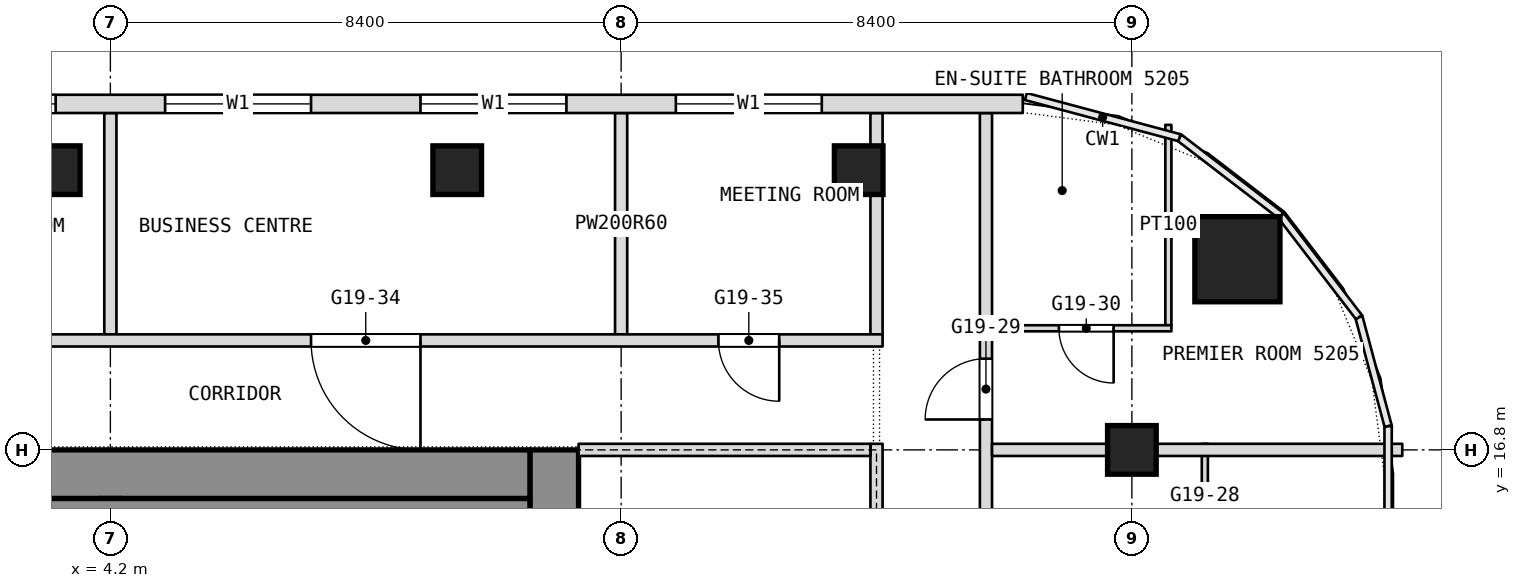
"""IFC4 building model, lengths in metres.
Left out: names, types, materials, properties, quantities, classifications, styles, units other than length and angle.
Written with IfcOpenShell. Run it as: python <this file> out.ifc"""

import sys

from ifc_helpers import new_model, si_unit, direction, frame, frame_2d, origin, origin_2d, place, context, subcontext, project, spatial, rectangle, extrude, element, fill, save


model = new_model("IFC4")
c1 = context("Model", 3, precision=1e-05, world=origin(), true_north=direction((0.0, 1.0)))
c2 = subcontext(c1, "Body", "Model", "MODEL_VIEW")
j1 = project(units=[si_unit("LENGTHUNIT", "METRE"), si_unit("PLANEANGLEUNIT", "RADIAN")], contexts=[c1])
p1 = place(None, origin())
s1 = spatial("IfcSite", under=j1, at=p1, CompositionType="ELEMENT")
p2 = place(p1, origin())
s2 = spatial("IfcBuilding", under=s1, at=p2, CompositionType="ELEMENT")
p3 = place(p2, frame((0.0, 0.0, 223.7)))
s3 = spatial("IfcBuildingStorey", under=s2, at=p3, CompositionType="ELEMENT", Elevation=223.7)
p4 = place(p3, frame((11.5, 0.0, 0.0), z_axis=(0.0, 0.0, 1.0), x_axis=(0.0, 1.0, 0.0)))
e1 = element("IfcWall", 1, at=p4, inside=s3, PredefinedType="SHEAR", context=c2, shape_type="SweptSolid", body=[
    extrude(rectangle(XDim=16.8, YDim=0.8, at=frame_2d((8.4, 0.0))), origin(), (0.0, 0.0, 1.0), 3.6),
])
p5 = place(p4, frame((2.3, 0.0, 0.0)))
e2 = element("IfcOpeningElement", 2, at=p5, cuts=e1, PredefinedType="OPENING", context=c2, shape_type="SweptSolid", body=[
    extrude(rectangle(XDim=1.1, YDim=2.1, at=frame_2d((0.55, 1.05))), frame((0.0, 0.4, 0.0), z_axis=(0.0, -1.0, 0.0), x_axis=(1.0, 0.0, 0.0)), (0.0, 0.0, 1.0), 0.8),
])
p6 = place(p4, frame((4.85, 0.0, 0.0)))
e3 = element("IfcOpeningElement", 3, at=p6, cuts=e1, PredefinedType="OPENING", context=c2, shape_type="SweptSolid", body=[
    extrude(rectangle(XDim=1.1, YDim=2.1, at=frame_2d((0.55, 1.05))), frame((0.0, 0.4, 0.0), z_axis=(0.0, -1.0, 0.0), x_axis=(1.0, 0.0, 0.0)), (0.0, 0.0, 1.0), 0.8),
])
p7 = place(p4, frame((6.825, 0.0, 0.0)))
e4 = element("IfcOpeningElement", 4, at=p7, cuts=e1, PredefinedType="OPENING", context=c2, shape_type="SweptSolid", body=[
    extrude(rectangle(XDim=1.2, YDim=2.1, at=frame_2d((0.6, 1.05))), frame((0.0, 0.4, 0.0), z_axis=(0.0, -1.0, 0.0), x_axis=(1.0, 0.0, 0.0)), (0.0, 0.0, 1.0), 0.8),
])
p8 = place(p4, frame((13.4, 0.0, 0.0)))
e5 = element("IfcOpeningElement", 5, at=p8, cuts=e1, PredefinedType="OPENING", context=c2, shape_type="SweptSolid", body=[
    extrude(rectangle(XDim=1.1, YDim=2.1, at=frame_2d((0.55, 1.05))), frame((0.0, 0.4, 0.0), z_axis=(0.0, -1.0, 0.0), x_axis=(1.0, 0.0, 0.0)), (0.0, 0.0, 1.0), 0.8),
])
p9 = place(p4, frame((10.85, 0.0, 0.0)))
e6 = element("IfcOpeningElement", 6, at=p9, cuts=e1, PredefinedType="OPENING", context=c2, shape_type="SweptSolid", body=[
    extrude(rectangle(XDim=1.1, YDim=2.1, at=frame_2d((0.55, 1.05))), frame((0.0, 0.4, 0.0), z_axis=(0.0, -1.0, 0.0), x_axis=(1.0, 0.0, 0.0)), (0.0, 0.0, 1.0), 0.8),
])
p10 = place(p4, frame((8.775, 0.0, 0.0)))
e7 = element("IfcOpeningElement", 7, at=p10, cuts=e1, PredefinedType="OPENING", context=c2, shape_type="SweptSolid", body=[
    extrude(rectangle(XDim=1.2, YDim=2.1, at=frame_2d((0.6, 1.05))), frame((0.0, 0.4, 0.0), z_axis=(0.0, -1.0, 0.0), x_axis=(1.0, 0.0, 0.0)), (0.0, 0.0, 1.0), 0.8),
])
p11 = place(p3, frame((-11.1, 16.4, 0.0), z_axis=(0.0, 0.0, 1.0), x_axis=(1.0, 0.0, 0.0)))
e8 = element("IfcWall", 8, at=p11, inside=s3, PredefinedType="SHEAR", context=c2, shape_type="SweptSolid", body=[
    extrude(rectangle(XDim=22.2, YDim=0.8, at=frame_2d((11.1, 0.0))), origin(), (0.0, 0.0, 1.0), 3.6),
])
p12 = place(p3, frame((4.2, 0.8, 0.0), z_axis=(0.0, 0.0, 1.0), x_axis=(0.0, 1.0, 0.0)))
e9 = element("IfcWall", 9, at=p12, inside=s3, PredefinedType="SHEAR", context=c2, shape_type="SweptSolid", body=[
    extrude(rectangle(XDim=15.2, YDim=0.4, at=frame_2d((7.6, 0.0))), origin(), (0.0, 0.0, 1.0), 3.6),
])
p13 = place(p12, frame((5.95, 0.0, 0.0)))
e10 = element("IfcOpeningElement", 10, at=p13, cuts=e9, PredefinedType="OPENING", context=c2, shape_type="SweptSolid", body=[
    extrude(rectangle(XDim=1.2, YDim=2.1, at=frame_2d((0.6, 1.05))), frame((0.0, 0.2, 0.0), z_axis=(0.0, -1.0, 0.0), x_axis=(1.0, 0.0, 0.0)), (0.0, 0.0, 1.0), 0.4),
])
p14 = place(p3, frame((22.736, 19.936, 0.0), z_axis=(0.0, 0.0, 1.0), x_axis=(1.0, 0.0, 0.0)))
e11 = element("IfcColumn", 11, at=p14, inside=s3, PredefinedType="COLUMN", context=c2, shape_type="SweptSolid", body=[
    extrude(rectangle(XDim=1.4, YDim=1.4, at=origin_2d()), origin(), (0.0, 0.0, 1.0), 3.6),
])
for number, where, z_axis, x_axis in (
    (12, (21.0, 16.8, 0.0), (0.0, 0.0, 1.0), (1.0, 0.0, 0.0)),
    (13, (3.302, 21.4, 0.0), (0.0, 0.0, 1.0), (1.0, 0.0, 0.0)),
    (14, (9.904, 21.4, 0.0), (0.0, 0.0, 1.0), (1.0, 0.0, 0.0)),
    (15, (16.507, 21.4, 0.0), (0.0, 0.0, 1.0), (1.0, 0.0, 0.0)),
):
    element("IfcColumn", number, at=place(p3, frame(where, z_axis=z_axis, x_axis=x_axis)), inside=s3, PredefinedType="COLUMN", context=c2, shape_type="SweptSolid", body=[
        extrude(rectangle(XDim=0.8, YDim=0.8, at=origin_2d()), origin(), (0.0, 0.0, 1.0), 3.6),
    ])
p15 = place(p3, frame((22.2, 14.45, 0.0), z_axis=(0.0, 0.0, 1.0), x_axis=(0.0, 1.0, 0.0)))
e16 = element("IfcWall", 16, at=p15, inside=s3, PredefinedType="PARTITIONING", context=c2, shape_type="SweptSolid", body=[
    extrude(rectangle(XDim=2.45, YDim=0.1, at=frame_2d((1.225, 0.0))), origin(), (0.0, 0.0, 1.0), 3.34),
])
p16 = place(p15, frame((0.15, 0.0, 0.0)))
e17 = element("IfcOpeningElement", 17, at=p16, cuts=e16, PredefinedType="OPENING", context=c2, shape_type="SweptSolid", body=[
    extrude(rectangle(XDim=0.9, YDim=2.1, at=frame_2d((0.45, 1.05))), frame((0.0, 0.05, 0.0), z_axis=(0.0, -1.0, 0.0), x_axis=(1.0, 0.0, 0.0)), (0.0, 0.0, 1.0), 0.1),
])
p17 = place(p3, frame((21.6, 18.85, 0.0), z_axis=(0.0, 0.0, 1.0), x_axis=(0.0, 1.0, 0.0)))
e18 = element("IfcWall", 18, at=p17, inside=s3, PredefinedType="PARTITIONING", context=c2, shape_type="SweptSolid", body=[
    extrude(rectangle(XDim=3.295, YDim=0.1, at=frame_2d((1.647, 0.0))), origin(), (0.0, 0.0, 1.0), 3.34),
])
p18 = place(p3, frame((18.6, -26.751, 0.0), z_axis=(0.0, 0.0, 1.0), x_axis=(0.0, 1.0, 0.0)))
e19 = element("IfcWall", 19, at=p18, inside=s3, PredefinedType="PARTITIONING", context=c2, shape_type="SweptSolid", body=[
    extrude(rectangle(XDim=49.091, YDim=0.2, at=frame_2d((24.545, 0.0))), origin(), (0.0, 0.0, 1.0), 3.34),
])
p19 = place(p18, frame((4.226, 0.0, 0.0)))
e20 = element("IfcOpeningElement", 20, at=p19, cuts=e19, PredefinedType="OPENING", context=c2, shape_type="SweptSolid", body=[
    extrude(rectangle(XDim=1.8, YDim=2.1, at=frame_2d((0.9, 1.05))), frame((0.0, 0.1, 0.0), z_axis=(0.0, -1.0, 0.0), x_axis=(1.0, 0.0, 0.0)), (0.0, 0.0, 1.0), 0.2),
])
p20 = place(p18, frame((10.351, 0.0, 0.0)))
e21 = element("IfcOpeningElement", 21, at=p20, cuts=e19, PredefinedType="OPENING", context=c2, shape_type="SweptSolid", body=[
    extrude(rectangle(XDim=1.0, YDim=2.1, at=frame_2d((0.5, 1.05))), frame((0.0, 0.1, 0.0), z_axis=(0.0, -1.0, 0.0), x_axis=(1.0, 0.0, 0.0)), (0.0, 0.0, 1.0), 0.2),
])
p21 = place(p18, frame((16.951, 0.0, 0.0)))
e22 = element("IfcOpeningElement", 22, at=p21, cuts=e19, PredefinedType="OPENING", context=c2, shape_type="SweptSolid", body=[
    extrude(rectangle(XDim=1.0, YDim=2.1, at=frame_2d((0.5, 1.05))), frame((0.0, 0.1, 0.0), z_axis=(0.0, -1.0, 0.0), x_axis=(1.0, 0.0, 0.0)), (0.0, 0.0, 1.0), 0.2),
])
p22 = place(p18, frame((22.051, 0.0, 0.0)))
e23 = element("IfcOpeningElement", 23, at=p22, cuts=e19, PredefinedType="OPENING", context=c2, shape_type="SweptSolid", body=[
    extrude(rectangle(XDim=1.1, YDim=2.1, at=frame_2d((0.55, 1.05))), frame((0.0, 0.1, 0.0), z_axis=(0.0, -1.0, 0.0), x_axis=(1.0, 0.0, 0.0)), (0.0, 0.0, 1.0), 0.2),
])
p23 = place(p18, frame((30.051, 0.0, 0.0)))
e24 = element("IfcOpeningElement", 24, at=p23, cuts=e19, PredefinedType="OPENING", context=c2, shape_type="SweptSolid", body=[
    extrude(rectangle(XDim=1.8, YDim=2.1, at=frame_2d((0.9, 1.05))), frame((0.0, 0.1, 0.0), z_axis=(0.0, -1.0, 0.0), x_axis=(1.0, 0.0, 0.0)), (0.0, 0.0, 1.0), 0.2),
])
p24 = place(p18, frame((38.851, 0.0, 0.0)))
e25 = element("IfcOpeningElement", 25, at=p24, cuts=e19, PredefinedType="OPENING", context=c2, shape_type="SweptSolid", body=[
    extrude(rectangle(XDim=1.1, YDim=2.1, at=frame_2d((0.55, 1.05))), frame((0.0, 0.1, 0.0), z_axis=(0.0, -1.0, 0.0), x_axis=(1.0, 0.0, 0.0)), (0.0, 0.0, 1.0), 0.2),
])
p25 = place(p18, frame((44.051, 0.0, 0.0)))
e26 = element("IfcOpeningElement", 26, at=p25, cuts=e19, PredefinedType="OPENING", context=c2, shape_type="SweptSolid", body=[
    extrude(rectangle(XDim=1.0, YDim=2.1, at=frame_2d((0.5, 1.05))), frame((0.0, 0.1, 0.0), z_axis=(0.0, -1.0, 0.0), x_axis=(1.0, 0.0, 0.0)), (0.0, 0.0, 1.0), 0.2),
])
for number, where, z_axis, x_axis in (
    (27, (16.8, 18.7, 0.0), (0.0, 0.0, 1.0), (0.0, 1.0, 0.0)),
    (28, (12.6, 18.7, 0.0), (0.0, 0.0, 1.0), (0.0, 1.0, 0.0)),
    (29, (4.2, 18.7, 0.0), (0.0, 0.0, 1.0), (0.0, 1.0, 0.0)),
):
    element("IfcWall", number, at=place(p3, frame(where, z_axis=z_axis, x_axis=x_axis)), inside=s3, PredefinedType="PARTITIONING", context=c2, shape_type="SweptSolid", body=[
        extrude(rectangle(XDim=3.64, YDim=0.2, at=frame_2d((1.82, 0.0))), origin(), (0.0, 0.0, 1.0), 3.34),
    ])
p26 = place(p3, frame((18.7, 16.8, 0.0), z_axis=(0.0, 0.0, 1.0), x_axis=(1.0, 0.0, 0.0)))
e30 = element("IfcWall", 30, at=p26, inside=s3, PredefinedType="PARTITIONING", context=c2, shape_type="SweptSolid", body=[
    extrude(rectangle(XDim=6.747, YDim=0.2, at=frame_2d((3.374, 0.0))), origin(), (0.0, 0.0, 1.0), 2.94),
])
p27 = place(p3, frame((-16.9, 18.6, 0.0), z_axis=(0.0, 0.0, 1.0), x_axis=(1.0, 0.0, 0.0)))
e31 = element("IfcWall", 31, at=p27, inside=s3, PredefinedType="PARTITIONING", context=c2, shape_type="SweptSolid", body=[
    extrude(rectangle(XDim=33.8, YDim=0.2, at=frame_2d((16.9, 0.0))), origin(), (0.0, 0.0, 1.0), 3.34),
])
p28 = place(p27, frame((1.7, 0.0, 0.0)))
e32 = element("IfcOpeningElement", 32, at=p28, cuts=e31, PredefinedType="OPENING", context=c2, shape_type="SweptSolid", body=[
    extrude(rectangle(XDim=1.0, YDim=2.1, at=frame_2d((0.5, 1.05))), frame((0.0, 0.1, 0.0), z_axis=(0.0, -1.0, 0.0), x_axis=(1.0, 0.0, 0.0)), (0.0, 0.0, 1.0), 0.2),
])
p29 = place(p27, frame((7.6, 0.0, 0.0)))
e33 = element("IfcOpeningElement", 33, at=p29, cuts=e31, PredefinedType="OPENING", context=c2, shape_type="SweptSolid", body=[
    extrude(rectangle(XDim=1.8, YDim=2.1, at=frame_2d((0.9, 1.05))), frame((0.0, 0.1, 0.0), z_axis=(0.0, -1.0, 0.0), x_axis=(1.0, 0.0, 0.0)), (0.0, 0.0, 1.0), 0.2),
])
p30 = place(p27, frame((16.0, 0.0, 0.0)))
e34 = element("IfcOpeningElement", 34, at=p30, cuts=e31, PredefinedType="OPENING", context=c2, shape_type="SweptSolid", body=[
    extrude(rectangle(XDim=1.8, YDim=2.1, at=frame_2d((0.9, 1.05))), frame((0.0, 0.1, 0.0), z_axis=(0.0, -1.0, 0.0), x_axis=(1.0, 0.0, 0.0)), (0.0, 0.0, 1.0), 0.2),
])
p31 = place(p27, frame((24.4, 0.0, 0.0)))
e35 = element("IfcOpeningElement", 35, at=p31, cuts=e31, PredefinedType="OPENING", context=c2, shape_type="SweptSolid", body=[
    extrude(rectangle(XDim=1.8, YDim=2.1, at=frame_2d((0.9, 1.05))), frame((0.0, 0.1, 0.0), z_axis=(0.0, -1.0, 0.0), x_axis=(1.0, 0.0, 0.0)), (0.0, 0.0, 1.0), 0.2),
])
p32 = place(p27, frame((31.1, 0.0, 0.0)))
e36 = element("IfcOpeningElement", 36, at=p32, cuts=e31, PredefinedType="OPENING", context=c2, shape_type="SweptSolid", body=[
    extrude(rectangle(XDim=1.0, YDim=2.1, at=frame_2d((0.5, 1.05))), frame((0.0, 0.1, 0.0), z_axis=(0.0, -1.0, 0.0), x_axis=(1.0, 0.0, 0.0)), (0.0, 0.0, 1.0), 0.2),
])
p33 = place(p3, frame((18.7, 18.8, 0.0), z_axis=(0.0, 0.0, 1.0), x_axis=(1.0, 0.0, 0.0)))
e37 = element("IfcWall", 37, at=p33, inside=s3, PredefinedType="PARTITIONING", context=c2, shape_type="SweptSolid", body=[
    extrude(rectangle(XDim=2.95, YDim=0.1, at=frame_2d((1.475, 0.0))), origin(), (0.0, 0.0, 1.0), 3.34),
])
p34 = place(p33, frame((1.1, 0.0, 0.0)))
e38 = element("IfcOpeningElement", 38, at=p34, cuts=e37, PredefinedType="OPENING", context=c2, shape_type="SweptSolid", body=[
    extrude(rectangle(XDim=0.9, YDim=2.1, at=frame_2d((0.45, 1.05))), frame((0.0, 0.05, 0.0), z_axis=(0.0, -1.0, 0.0), x_axis=(1.0, 0.0, 0.0)), (0.0, 0.0, 1.0), 0.1),
])
p35 = place(p3, frame((19.206, 22.49, 0.0), z_axis=(0.0, 0.0, 1.0), x_axis=(-1.0, 0.0, 0.0)))
e39 = element("IfcWall", 39, at=p35, inside=s3, PredefinedType="NOTDEFINED", context=c2, shape_type="SweptSolid", body=[
    extrude(rectangle(XDim=38.412, YDim=0.3, at=frame_2d((19.206, 0.0))), origin(), (0.0, 0.0, 1.0), 3.6),
])
p36 = place(p35, frame((3.306, 0.0, 0.9)))
e40 = element("IfcOpeningElement", 40, at=p36, cuts=e39, PredefinedType="OPENING", context=c2, shape_type="SweptSolid", body=[
    extrude(rectangle(XDim=2.4, YDim=2.1, at=frame_2d((1.2, 1.05))), frame((0.0, 0.15, 0.0), z_axis=(0.0, -1.0, 0.0), x_axis=(1.0, 0.0, 0.0)), (0.0, 0.0, 1.0), 0.3),
])
p37 = place(p35, frame((7.506, 0.0, 0.9)))
e41 = element("IfcOpeningElement", 41, at=p37, cuts=e39, PredefinedType="OPENING", context=c2, shape_type="SweptSolid", body=[
    extrude(rectangle(XDim=2.4, YDim=2.1, at=frame_2d((1.2, 1.05))), frame((0.0, 0.15, 0.0), z_axis=(0.0, -1.0, 0.0), x_axis=(1.0, 0.0, 0.0)), (0.0, 0.0, 1.0), 0.3),
])
p38 = place(p35, frame((11.706, 0.0, 0.9)))
e42 = element("IfcOpeningElement", 42, at=p38, cuts=e39, PredefinedType="OPENING", context=c2, shape_type="SweptSolid", body=[
    extrude(rectangle(XDim=2.4, YDim=2.1, at=frame_2d((1.2, 1.05))), frame((0.0, 0.15, 0.0), z_axis=(0.0, -1.0, 0.0), x_axis=(1.0, 0.0, 0.0)), (0.0, 0.0, 1.0), 0.3),
])
p39 = place(p35, frame((15.906, 0.0, 0.9)))
e43 = element("IfcOpeningElement", 43, at=p39, cuts=e39, PredefinedType="OPENING", context=c2, shape_type="SweptSolid", body=[
    extrude(rectangle(XDim=2.4, YDim=2.1, at=frame_2d((1.2, 1.05))), frame((0.0, 0.15, 0.0), z_axis=(0.0, -1.0, 0.0), x_axis=(1.0, 0.0, 0.0)), (0.0, 0.0, 1.0), 0.3),
])
p40 = place(p35, frame((20.106, 0.0, 0.9)))
e44 = element("IfcOpeningElement", 44, at=p40, cuts=e39, PredefinedType="OPENING", context=c2, shape_type="SweptSolid", body=[
    extrude(rectangle(XDim=2.4, YDim=2.1, at=frame_2d((1.2, 1.05))), frame((0.0, 0.15, 0.0), z_axis=(0.0, -1.0, 0.0), x_axis=(1.0, 0.0, 0.0)), (0.0, 0.0, 1.0), 0.3),
])
p41 = place(p35, frame((24.306, 0.0, 0.9)))
e45 = element("IfcOpeningElement", 45, at=p41, cuts=e39, PredefinedType="OPENING", context=c2, shape_type="SweptSolid", body=[
    extrude(rectangle(XDim=2.4, YDim=2.1, at=frame_2d((1.2, 1.05))), frame((0.0, 0.15, 0.0), z_axis=(0.0, -1.0, 0.0), x_axis=(1.0, 0.0, 0.0)), (0.0, 0.0, 1.0), 0.3),
])
p42 = place(p35, frame((28.506, 0.0, 0.9)))
e46 = element("IfcOpeningElement", 46, at=p42, cuts=e39, PredefinedType="OPENING", context=c2, shape_type="SweptSolid", body=[
    extrude(rectangle(XDim=2.4, YDim=2.1, at=frame_2d((1.2, 1.05))), frame((0.0, 0.15, 0.0), z_axis=(0.0, -1.0, 0.0), x_axis=(1.0, 0.0, 0.0)), (0.0, 0.0, 1.0), 0.3),
])
p43 = place(p35, frame((32.706, 0.0, 0.9)))
e47 = element("IfcOpeningElement", 47, at=p43, cuts=e39, PredefinedType="OPENING", context=c2, shape_type="SweptSolid", body=[
    extrude(rectangle(XDim=2.4, YDim=2.1, at=frame_2d((1.2, 1.05))), frame((0.0, 0.15, 0.0), z_axis=(0.0, -1.0, 0.0), x_axis=(1.0, 0.0, 0.0)), (0.0, 0.0, 1.0), 0.3),
])
p44 = place(p3, frame((-11.1, 15.65, 0.0), z_axis=(0.0, 0.0, 1.0), x_axis=(1.0, 0.0, 0.0)))
e48 = element("IfcWall", 48, at=p44, inside=s3, PredefinedType="PARTITIONING", context=c2, shape_type="SweptSolid", body=[
    extrude(rectangle(XDim=22.2, YDim=0.7, at=frame_2d((11.1, 0.0))), origin(), (0.0, 0.0, 1.0), 3.34),
])
p45 = place(p3, frame((16.8, -0.1, 0.0), z_axis=(0.0, 0.0, 1.0), x_axis=(0.0, 1.0, 0.0)))
e49 = element("IfcWall", 49, at=p45, inside=s3, PredefinedType="PARTITIONING", context=c2, shape_type="SweptSolid", body=[
    extrude(rectangle(XDim=17.0, YDim=0.2, at=frame_2d((8.5, 0.0))), origin(), (0.0, 0.0, 1.0), 3.34),
])
p46 = place(p45, frame((2.2, 0.0, 0.0)))
e50 = element("IfcOpeningElement", 50, at=p46, cuts=e49, PredefinedType="OPENING", context=c2, shape_type="SweptSolid", body=[
    extrude(rectangle(XDim=1.8, YDim=2.1, at=frame_2d((0.9, 1.05))), frame((0.0, 0.1, 0.0), z_axis=(0.0, -1.0, 0.0), x_axis=(1.0, 0.0, 0.0)), (0.0, 0.0, 1.0), 0.2),
])
p47 = place(p45, frame((13.0, 0.0, 0.0)))
e51 = element("IfcOpeningElement", 51, at=p47, cuts=e49, PredefinedType="OPENING", context=c2, shape_type="SweptSolid", body=[
    extrude(rectangle(XDim=1.8, YDim=2.1, at=frame_2d((0.9, 1.05))), frame((0.0, 0.1, 0.0), z_axis=(0.0, -1.0, 0.0), x_axis=(1.0, 0.0, 0.0)), (0.0, 0.0, 1.0), 0.2),
])
p48 = place(p3, frame((11.9, 16.8, 0.0), z_axis=(0.0, 0.0, 1.0), x_axis=(1.0, 0.0, 0.0)))
e52 = element("IfcWall", 52, at=p48, inside=s3, PredefinedType="PARTITIONING", context=c2, shape_type="SweptSolid", body=[
    extrude(rectangle(XDim=4.8, YDim=0.2, at=frame_2d((2.4, 0.0))), origin(), (0.0, 0.0, 1.0), 2.94),
])
p49 = place(p25, origin())
e53 = element("IfcDoor", 53, at=p49, inside=s3, OperationType="SINGLE_SWING_LEFT", PredefinedType="DOOR", context=c2, shape_type="SweptSolid", body=[
    extrude(rectangle(XDim=1.0, YDim=2.1, at=frame_2d((0.5, 1.05))), frame((0.0, 0.025, 0.0), z_axis=(0.0, -1.0, 0.0), x_axis=(1.0, 0.0, 0.0)), (0.0, 0.0, 1.0), 0.05),
])
fill(e26, e53)
p50 = place(p31, origin())
e54 = element("IfcDoor", 54, at=p50, inside=s3, OperationType="DOUBLE_DOOR_SINGLE_SWING", PredefinedType="DOOR", context=c2, shape_type="SweptSolid", body=[
    extrude(rectangle(XDim=1.8, YDim=2.1, at=frame_2d((0.9, 1.05))), frame((0.0, 0.025, 0.0), z_axis=(0.0, -1.0, 0.0), x_axis=(1.0, 0.0, 0.0)), (0.0, 0.0, 1.0), 0.05),
])
fill(e35, e54)
p51 = place(p32, origin())
e55 = element("IfcDoor", 55, at=p51, inside=s3, OperationType="SINGLE_SWING_LEFT", PredefinedType="DOOR", context=c2, shape_type="SweptSolid", body=[
    extrude(rectangle(XDim=1.0, YDim=2.1, at=frame_2d((0.5, 1.05))), frame((0.0, 0.025, 0.0), z_axis=(0.0, -1.0, 0.0), x_axis=(1.0, 0.0, 0.0)), (0.0, 0.0, 1.0), 0.05),
])
fill(e36, e55)
p52 = place(p34, origin())
e56 = element("IfcDoor", 56, at=p52, inside=s3, OperationType="SINGLE_SWING_RIGHT", PredefinedType="DOOR", context=c2, shape_type="SweptSolid", body=[
    extrude(rectangle(XDim=0.9, YDim=2.1, at=frame_2d((0.45, 1.05))), frame((0.0, 0.025, 0.0), z_axis=(0.0, -1.0, 0.0), x_axis=(1.0, 0.0, 0.0)), (0.0, 0.0, 1.0), 0.05),
])
fill(e38, e56)
p53 = place(p36, origin())
e57 = element("IfcWindow", 57, at=p53, inside=s3, PartitioningType="SINGLE_PANEL", PredefinedType="WINDOW", context=c2, shape_type="SweptSolid", body=[
    extrude(rectangle(XDim=2.4, YDim=2.1, at=frame_2d((1.2, 1.05))), frame((0.0, 0.03, 0.0), z_axis=(0.0, -1.0, 0.0), x_axis=(1.0, 0.0, 0.0)), (0.0, 0.0, 1.0), 0.06),
])
fill(e40, e57)
p54 = place(p37, origin())
e58 = element("IfcWindow", 58, at=p54, inside=s3, PartitioningType="SINGLE_PANEL", PredefinedType="WINDOW", context=c2, shape_type="SweptSolid", body=[
    extrude(rectangle(XDim=2.4, YDim=2.1, at=frame_2d((1.2, 1.05))), frame((0.0, 0.03, 0.0), z_axis=(0.0, -1.0, 0.0), x_axis=(1.0, 0.0, 0.0)), (0.0, 0.0, 1.0), 0.06),
])
fill(e41, e58)
p55 = place(p38, origin())
e59 = element("IfcWindow", 59, at=p55, inside=s3, PartitioningType="SINGLE_PANEL", PredefinedType="WINDOW", context=c2, shape_type="SweptSolid", body=[
    extrude(rectangle(XDim=2.4, YDim=2.1, at=frame_2d((1.2, 1.05))), frame((0.0, 0.03, 0.0), z_axis=(0.0, -1.0, 0.0), x_axis=(1.0, 0.0, 0.0)), (0.0, 0.0, 1.0), 0.06),
])
fill(e42, e59)
p56 = place(p39, origin())
e60 = element("IfcWindow", 60, at=p56, inside=s3, PartitioningType="SINGLE_PANEL", PredefinedType="WINDOW", context=c2, shape_type="SweptSolid", body=[
    extrude(rectangle(XDim=2.4, YDim=2.1, at=frame_2d((1.2, 1.05))), frame((0.0, 0.03, 0.0), z_axis=(0.0, -1.0, 0.0), x_axis=(1.0, 0.0, 0.0)), (0.0, 0.0, 1.0), 0.06),
])
fill(e43, e60)
save(model, sys.argv[1])
